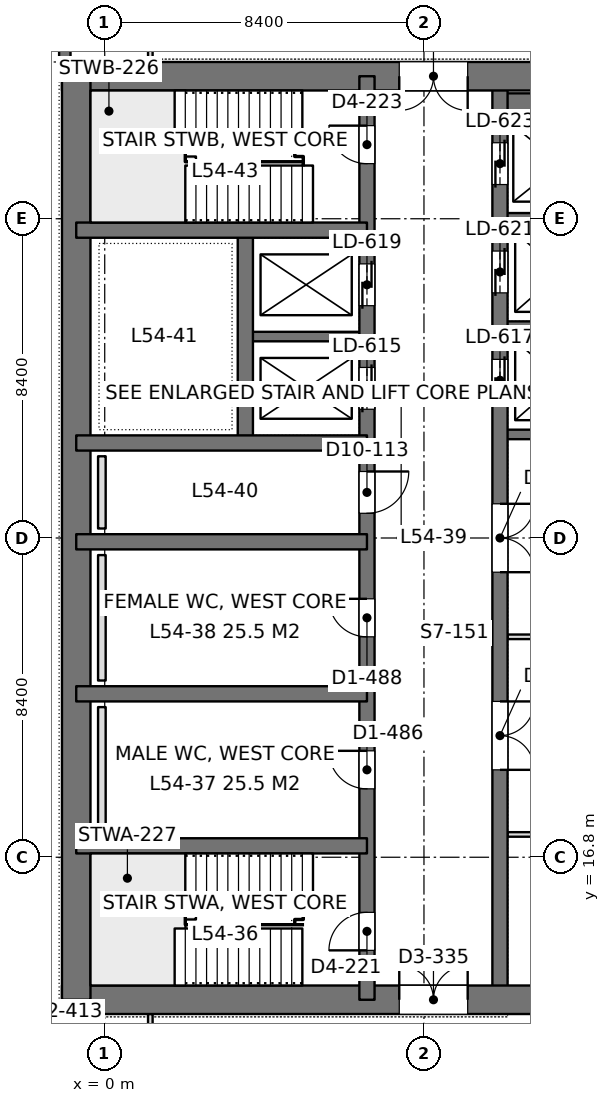
"""IFC4 building model, lengths in metres.
Left out: names, types, materials, properties, quantities, classifications, styles, units other than length and angle.
Written with IfcOpenShell. Run it as: python <this file> out.ifc"""

import sys

from ifc_helpers import new_model, si_unit, direction, frame, frame_2d, origin, place, context, subcontext, project, spatial, rectangle, extrude, element, fill, save


model = new_model("IFC4")
c1 = context("Model", 3, precision=1e-05, world=origin(), true_north=direction((0.0, 1.0)))
c2 = subcontext(c1, "Body", "Model", "MODEL_VIEW")
j1 = project(units=[si_unit("LENGTHUNIT", "METRE"), si_unit("PLANEANGLEUNIT", "RADIAN")], contexts=[c1])
p1 = place(None, origin())
s1 = spatial("IfcSite", under=j1, at=p1, CompositionType="ELEMENT")
p2 = place(p1, origin())
s2 = spatial("IfcBuilding", under=s1, at=p2, CompositionType="ELEMENT")
p3 = place(p2, frame((0.0, 0.0, 236.4)))
s3 = spatial("IfcBuildingStorey", under=s2, at=p3, CompositionType="ELEMENT", Elevation=236.4)
p4 = place(p3, frame((-1.125, 13.05, 0.0), z_axis=(0.0, 0.0, 1.0), x_axis=(1.0, 0.0, 0.0)))
e1 = element("IfcWall", 1, at=p4, inside=s3, PredefinedType="SHEAR", context=c2, shape_type="SweptSolid", body=[
    extrude(rectangle(XDim=17.85, YDim=0.75, at=frame_2d((8.925, 0.0))), origin(), (0.0, 0.0, 1.0), 4.2),
])
p5 = place(p4, frame((8.875, 0.0, 0.0)))
e2 = element("IfcOpeningElement", 2, at=p5, cuts=e1, PredefinedType="OPENING", context=c2, shape_type="SweptSolid", body=[
    extrude(rectangle(XDim=1.8, YDim=2.4, at=frame_2d((0.9, 1.2))), frame((0.0, 0.385, 0.0), z_axis=(0.0, -1.0, 0.0), x_axis=(1.0, 0.0, 0.0)), (0.0, 0.0, 1.0), 0.77),
])
p6 = place(p3, frame((-1.125, 37.35, 0.0), z_axis=(0.0, 0.0, 1.0), x_axis=(1.0, 0.0, 0.0)))
e3 = element("IfcWall", 3, at=p6, inside=s3, PredefinedType="SHEAR", context=c2, shape_type="SweptSolid", body=[
    extrude(rectangle(XDim=17.85, YDim=0.75, at=frame_2d((8.925, 0.0))), origin(), (0.0, 0.0, 1.0), 4.2),
])
p7 = place(p6, frame((8.875, 0.0, 0.0)))
e4 = element("IfcOpeningElement", 4, at=p7, cuts=e3, PredefinedType="OPENING", context=c2, shape_type="SweptSolid", body=[
    extrude(rectangle(XDim=1.8, YDim=2.4, at=frame_2d((0.9, 1.2))), frame((0.0, 0.385, 0.0), z_axis=(0.0, -1.0, 0.0), x_axis=(1.0, 0.0, 0.0)), (0.0, 0.0, 1.0), 0.77),
])
p8 = place(p3, frame((-0.75, 13.05, 0.0), z_axis=(0.0, 0.0, 1.0), x_axis=(0.0, 1.0, 0.0)))
e5 = element("IfcWall", 5, at=p8, inside=s3, PredefinedType="SHEAR", context=c2, shape_type="SweptSolid", body=[
    extrude(rectangle(XDim=24.3, YDim=0.75, at=frame_2d((12.15, 0.0))), origin(), (0.0, 0.0, 1.0), 4.2),
])
p9 = place(p3, frame((6.9, 13.05, 0.0), z_axis=(0.0, 0.0, 1.0), x_axis=(0.0, 1.0, 0.0)))
e6 = element("IfcWall", 6, at=p9, inside=s3, PredefinedType="SHEAR", context=c2, shape_type="SweptSolid", body=[
    extrude(rectangle(XDim=24.3, YDim=0.4, at=frame_2d((12.15, 0.0))), origin(), (0.0, 0.0, 1.0), 4.2),
])
p10 = place(p9, frame((1.3, 0.0, 0.0)))
e7 = element("IfcOpeningElement", 7, at=p10, cuts=e6, PredefinedType="OPENING", context=c2, shape_type="SweptSolid", body=[
    extrude(rectangle(XDim=1.0, YDim=2.2, at=frame_2d((0.5, 1.1))), frame((0.0, 0.21, 0.0), z_axis=(0.0, -1.0, 0.0), x_axis=(1.0, 0.0, 0.0)), (0.0, 0.0, 1.0), 0.42),
])
p11 = place(p9, frame((22.0, 0.0, 0.0)))
e8 = element("IfcOpeningElement", 8, at=p11, cuts=e6, PredefinedType="OPENING", context=c2, shape_type="SweptSolid", body=[
    extrude(rectangle(XDim=1.0, YDim=2.2, at=frame_2d((0.5, 1.1))), frame((0.0, 0.21, 0.0), z_axis=(0.0, -1.0, 0.0), x_axis=(1.0, 0.0, 0.0)), (0.0, 0.0, 1.0), 0.42),
])
p12 = place(p9, frame((5.55, 0.0, 0.0)))
e9 = element("IfcOpeningElement", 9, at=p12, cuts=e6, PredefinedType="OPENING", context=c2, shape_type="SweptSolid", body=[
    extrude(rectangle(XDim=1.0, YDim=2.2, at=frame_2d((0.5, 1.1))), frame((0.0, 0.21, 0.0), z_axis=(0.0, -1.0, 0.0), x_axis=(1.0, 0.0, 0.0)), (0.0, 0.0, 1.0), 0.42),
])
p13 = place(p9, frame((9.55, 0.0, 0.0)))
e10 = element("IfcOpeningElement", 10, at=p13, cuts=e6, PredefinedType="OPENING", context=c2, shape_type="SweptSolid", body=[
    extrude(rectangle(XDim=1.0, YDim=2.2, at=frame_2d((0.5, 1.1))), frame((0.0, 0.21, 0.0), z_axis=(0.0, -1.0, 0.0), x_axis=(1.0, 0.0, 0.0)), (0.0, 0.0, 1.0), 0.42),
])
p14 = place(p9, frame((12.8, 0.0, 0.0)))
e11 = element("IfcOpeningElement", 11, at=p14, cuts=e6, PredefinedType="OPENING", context=c2, shape_type="SweptSolid", body=[
    extrude(rectangle(XDim=1.1, YDim=2.2, at=frame_2d((0.55, 1.1))), frame((0.0, 0.21, 0.0), z_axis=(0.0, -1.0, 0.0), x_axis=(1.0, 0.0, 0.0)), (0.0, 0.0, 1.0), 0.42),
])
p15 = place(p9, frame((15.538, 0.0, 0.0)))
e12 = element("IfcOpeningElement", 12, at=p15, cuts=e6, PredefinedType="OPENING", context=c2, shape_type="SweptSolid", body=[
    extrude(rectangle(XDim=1.1, YDim=2.2, at=frame_2d((0.55, 1.1))), frame((0.0, 0.21, 0.0), z_axis=(0.0, -1.0, 0.0), x_axis=(1.0, 0.0, 0.0)), (0.0, 0.0, 1.0), 0.42),
])
p16 = place(p9, frame((18.262, 0.0, 0.0)))
e13 = element("IfcOpeningElement", 13, at=p16, cuts=e6, PredefinedType="OPENING", context=c2, shape_type="SweptSolid", body=[
    extrude(rectangle(XDim=1.1, YDim=2.2, at=frame_2d((0.55, 1.1))), frame((0.0, 0.21, 0.0), z_axis=(0.0, -1.0, 0.0), x_axis=(1.0, 0.0, 0.0)), (0.0, 0.0, 1.0), 0.42),
])
p17 = place(p3, frame((10.4, 13.05, 0.0), z_axis=(0.0, 0.0, 1.0), x_axis=(0.0, 1.0, 0.0)))
e14 = element("IfcWall", 14, at=p17, inside=s3, PredefinedType="SHEAR", context=c2, shape_type="SweptSolid", body=[
    extrude(rectangle(XDim=24.3, YDim=0.4, at=frame_2d((12.15, 0.0))), origin(), (0.0, 0.0, 1.0), 4.2),
])
p18 = place(p17, frame((15.75, 0.0, 0.0)))
e15 = element("IfcOpeningElement", 15, at=p18, cuts=e14, PredefinedType="OPENING", context=c2, shape_type="SweptSolid", body=[
    extrude(rectangle(XDim=1.1, YDim=2.2, at=frame_2d((0.55, 1.1))), frame((0.0, 0.21, 0.0), z_axis=(0.0, -1.0, 0.0), x_axis=(1.0, 0.0, 0.0)), (0.0, 0.0, 1.0), 0.42),
])
p19 = place(p17, frame((18.6, 0.0, 0.0)))
e16 = element("IfcOpeningElement", 16, at=p19, cuts=e14, PredefinedType="OPENING", context=c2, shape_type="SweptSolid", body=[
    extrude(rectangle(XDim=1.1, YDim=2.2, at=frame_2d((0.55, 1.1))), frame((0.0, 0.21, 0.0), z_axis=(0.0, -1.0, 0.0), x_axis=(1.0, 0.0, 0.0)), (0.0, 0.0, 1.0), 0.42),
])
p20 = place(p17, frame((21.45, 0.0, 0.0)))
e17 = element("IfcOpeningElement", 17, at=p20, cuts=e14, PredefinedType="OPENING", context=c2, shape_type="SweptSolid", body=[
    extrude(rectangle(XDim=1.1, YDim=2.2, at=frame_2d((0.55, 1.1))), frame((0.0, 0.21, 0.0), z_axis=(0.0, -1.0, 0.0), x_axis=(1.0, 0.0, 0.0)), (0.0, 0.0, 1.0), 0.42),
])
p21 = place(p17, frame((6.05, 0.0, 0.0)))
e18 = element("IfcOpeningElement", 18, at=p21, cuts=e14, PredefinedType="OPENING", context=c2, shape_type="SweptSolid", body=[
    extrude(rectangle(XDim=1.8, YDim=2.4, at=frame_2d((0.9, 1.2))), frame((0.0, 0.21, 0.0), z_axis=(0.0, -1.0, 0.0), x_axis=(1.0, 0.0, 0.0)), (0.0, 0.0, 1.0), 0.42),
])
p22 = place(p17, frame((11.25, 0.0, 0.0)))
e19 = element("IfcOpeningElement", 19, at=p22, cuts=e14, PredefinedType="OPENING", context=c2, shape_type="SweptSolid", body=[
    extrude(rectangle(XDim=1.8, YDim=2.4, at=frame_2d((0.9, 1.2))), frame((0.0, 0.21, 0.0), z_axis=(0.0, -1.0, 0.0), x_axis=(1.0, 0.0, 0.0)), (0.0, 0.0, 1.0), 0.42),
])
for number, where, z_axis, x_axis in (
    (20, (-0.75, 17.1, 0.0), (0.0, 0.0, 1.0), (1.0, 0.0, 0.0)),
    (21, (-0.75, 21.1, 0.0), (0.0, 0.0, 1.0), (1.0, 0.0, 0.0)),
    (22, (-0.75, 25.1, 0.0), (0.0, 0.0, 1.0), (1.0, 0.0, 0.0)),
    (23, (-0.75, 27.7, 0.0), (0.0, 0.0, 1.0), (1.0, 0.0, 0.0)),
    (24, (-0.75, 33.3, 0.0), (0.0, 0.0, 1.0), (1.0, 0.0, 0.0)),
):
    element("IfcWall", number, at=place(p3, frame(where, z_axis=z_axis, x_axis=x_axis)), inside=s3, PredefinedType="SHEAR", context=c2, shape_type="SweptSolid", body=[
        extrude(rectangle(XDim=7.65, YDim=0.4, at=frame_2d((3.825, 0.0))), origin(), (0.0, 0.0, 1.0), 4.2),
    ])
p23 = place(p3, frame((3.7, 27.7, 0.0), z_axis=(0.0, 0.0, 1.0), x_axis=(0.0, 1.0, 0.0)))
e25 = element("IfcWall", 25, at=p23, inside=s3, PredefinedType="SHEAR", context=c2, shape_type="SweptSolid", body=[
    extrude(rectangle(XDim=5.6, YDim=0.4, at=frame_2d((2.8, 0.0))), origin(), (0.0, 0.0, 1.0), 4.2),
])
p24 = place(p3, frame((3.7, 30.5, 0.0), z_axis=(0.0, 0.0, 1.0), x_axis=(1.0, 0.0, 0.0)))
e26 = element("IfcWall", 26, at=p24, inside=s3, PredefinedType="SHEAR", context=c2, shape_type="SweptSolid", body=[
    extrude(rectangle(XDim=3.2, YDim=0.25, at=frame_2d((1.6, 0.0))), origin(), (0.0, 0.0, 1.0), 4.2),
])
p25 = place(p3, frame((10.4, 27.925, 0.0), z_axis=(0.0, 0.0, 1.0), x_axis=(1.0, 0.0, 0.0)))
e27 = element("IfcWall", 27, at=p25, inside=s3, PredefinedType="SHEAR", context=c2, shape_type="SweptSolid", body=[
    extrude(rectangle(XDim=5.95, YDim=0.25, at=frame_2d((2.975, 0.0))), origin(), (0.0, 0.0, 1.0), 4.2),
])
for number, where, z_axis, x_axis in (
    (28, (10.4, 30.775, 0.0), (0.0, 0.0, 1.0), (1.0, 0.0, 0.0)),
    (29, (10.4, 33.625, 0.0), (0.0, 0.0, 1.0), (1.0, 0.0, 0.0)),
):
    element("IfcWall", number, at=place(p3, frame(where, z_axis=z_axis, x_axis=x_axis)), inside=s3, PredefinedType="SHEAR", context=c2, shape_type="SweptSolid", body=[
        extrude(rectangle(XDim=3.2, YDim=0.25, at=frame_2d((1.6, 0.0))), origin(), (0.0, 0.0, 1.0), 4.2),
    ])
p26 = place(p3, frame((10.4, 36.625, 0.0), z_axis=(0.0, 0.0, 1.0), x_axis=(1.0, 0.0, 0.0)))
e30 = element("IfcWall", 30, at=p26, inside=s3, PredefinedType="SHEAR", context=c2, shape_type="SweptSolid", body=[
    extrude(rectangle(XDim=3.2, YDim=0.55, at=frame_2d((1.6, 0.0))), origin(), (0.0, 0.0, 1.0), 4.2),
])
p27 = place(p3, frame((-1.05, 8.4, 0.0), z_axis=(0.0, 0.0, 1.0), x_axis=(0.0, 1.0, 0.0)))
e31 = element("IfcWall", 31, at=p27, inside=s3, PredefinedType="SOLIDWALL", context=c2, shape_type="SweptSolid", body=[
    extrude(rectangle(XDim=4.275, YDim=0.3, at=frame_2d((2.138, 0.0))), origin(), (0.0, 0.0, 1.0), 4.05),
])
p28 = place(p27, frame((0.938, 0.0, 0.9)))
e32 = element("IfcOpeningElement", 32, at=p28, cuts=e31, PredefinedType="OPENING", context=c2, shape_type="SweptSolid", body=[
    extrude(rectangle(XDim=2.4, YDim=1.9, at=frame_2d((1.2, 0.95))), frame((0.0, 0.16, 0.0), z_axis=(0.0, -1.0, 0.0), x_axis=(1.0, 0.0, 0.0)), (0.0, 0.0, 1.0), 0.32),
])
p29 = place(p3, frame((-1.05, 37.725, 0.0), z_axis=(0.0, 0.0, 1.0), x_axis=(0.0, 1.0, 0.0)))
e33 = element("IfcWall", 33, at=p29, inside=s3, PredefinedType="SOLIDWALL", context=c2, shape_type="SweptSolid", body=[
    extrude(rectangle(XDim=4.275, YDim=0.3, at=frame_2d((2.137, 0.0))), origin(), (0.0, 0.0, 1.0), 4.05),
])
p30 = place(p29, frame((0.938, 0.0, 0.9)))
e34 = element("IfcOpeningElement", 34, at=p30, cuts=e33, PredefinedType="OPENING", context=c2, shape_type="SweptSolid", body=[
    extrude(rectangle(XDim=2.4, YDim=1.9, at=frame_2d((1.2, 0.95))), frame((0.0, 0.16, 0.0), z_axis=(0.0, -1.0, 0.0), x_axis=(1.0, 0.0, 0.0)), (0.0, 0.0, 1.0), 0.32),
])
p31 = place(p3, frame((10.598, 17.4, 0.0), z_axis=(0.0, 0.0, 1.0), x_axis=(1.0, 0.0, 0.0)))
e35 = element("IfcWall", 35, at=p31, inside=s3, PredefinedType="PARTITIONING", context=c2, shape_type="SweptSolid", body=[
    extrude(rectangle(XDim=5.904, YDim=0.12, at=frame_2d((2.952, 0.0))), origin(), (0.0, 0.0, 1.0), 3.55),
])
p32 = place(p3, frame((10.598, 22.6, 0.0), z_axis=(0.0, 0.0, 1.0), x_axis=(1.0, 0.0, 0.0)))
e36 = element("IfcWall", 36, at=p32, inside=s3, PredefinedType="PARTITIONING", context=c2, shape_type="SweptSolid", body=[
    extrude(rectangle(XDim=5.053, YDim=0.12, at=frame_2d((2.526, 0.0))), origin(), (0.0, 0.0, 1.0), 4.05),
])
for number, where, z_axis, x_axis in (
    (37, (1.2, 11.1, 0.0), (0.0, 0.0, 1.0), (0.0, 1.0, 0.0)),
    (38, (1.2, 37.724, 0.0), (0.0, 0.0, 1.0), (0.0, 1.0, 0.0)),
):
    element("IfcWall", number, at=place(p3, frame(where, z_axis=z_axis, x_axis=x_axis)), inside=s3, PredefinedType="PARTITIONING", context=c2, shape_type="SweptSolid", body=[
        extrude(rectangle(XDim=1.576, YDim=0.12, at=frame_2d((0.788, 0.0))), origin(), (0.0, 0.0, 1.0), 4.05),
    ])
for number, where, z_axis, x_axis in (
    (39, (-0.075, 17.45, 0.0), (0.0, 0.0, 1.0), (0.0, 1.0, 0.0)),
    (40, (-0.075, 21.45, 0.0), (0.0, 0.0, 1.0), (0.0, 1.0, 0.0)),
):
    element("IfcWall", number, at=place(p3, frame(where, z_axis=z_axis, x_axis=x_axis)), inside=s3, PredefinedType="PLUMBINGWALL", context=c2, shape_type="SweptSolid", body=[
        extrude(rectangle(XDim=3.3, YDim=0.2, at=frame_2d((1.65, 0.0))), origin(), (0.0, 0.0, 1.0), 1.2),
    ])
p33 = place(p3, frame((-0.075, 25.45, 0.0), z_axis=(0.0, 0.0, 1.0), x_axis=(0.0, 1.0, 0.0)))
e41 = element("IfcWall", 41, at=p33, inside=s3, PredefinedType="PLUMBINGWALL", context=c2, shape_type="SweptSolid", body=[
    extrude(rectangle(XDim=1.9, YDim=0.2, at=frame_2d((0.95, 0.0))), origin(), (0.0, 0.0, 1.0), 1.2),
])
p34 = place(p5, origin())
e42 = element("IfcDoor", 42, at=p34, inside=s3, OperationType="DOUBLE_DOOR_SINGLE_SWING", PredefinedType="DOOR", context=c2, shape_type="SweptSolid", body=[
    extrude(rectangle(XDim=1.8, YDim=2.4, at=frame_2d((0.9, 1.2))), frame((0.0, 0.025, 0.0), z_axis=(0.0, -1.0, 0.0), x_axis=(1.0, 0.0, 0.0)), (0.0, 0.0, 1.0), 0.05),
])
fill(e2, e42)
p35 = place(p7, frame((1.8, 0.0, 0.0), z_axis=(0.0, 0.0, 1.0), x_axis=(-1.0, 0.0, 0.0)))
e43 = element("IfcDoor", 43, at=p35, inside=s3, OperationType="DOUBLE_DOOR_SINGLE_SWING", PredefinedType="DOOR", context=c2, shape_type="SweptSolid", body=[
    extrude(rectangle(XDim=1.8, YDim=2.4, at=frame_2d((0.9, 1.2))), frame((0.0, 0.025, 0.0), z_axis=(0.0, -1.0, 0.0), x_axis=(1.0, 0.0, 0.0)), (0.0, 0.0, 1.0), 0.05),
])
fill(e4, e43)
p36 = place(p10, origin())
e44 = element("IfcDoor", 44, at=p36, inside=s3, OperationType="SINGLE_SWING_LEFT", PredefinedType="DOOR", context=c2, shape_type="SweptSolid", body=[
    extrude(rectangle(XDim=1.0, YDim=2.2, at=frame_2d((0.5, 1.1))), frame((0.0, 0.025, 0.0), z_axis=(0.0, -1.0, 0.0), x_axis=(1.0, 0.0, 0.0)), (0.0, 0.0, 1.0), 0.05),
])
fill(e7, e44)
p37 = place(p11, origin())
e45 = element("IfcDoor", 45, at=p37, inside=s3, OperationType="SINGLE_SWING_RIGHT", PredefinedType="DOOR", context=c2, shape_type="SweptSolid", body=[
    extrude(rectangle(XDim=1.0, YDim=2.2, at=frame_2d((0.5, 1.1))), frame((0.0, 0.025, 0.0), z_axis=(0.0, -1.0, 0.0), x_axis=(1.0, 0.0, 0.0)), (0.0, 0.0, 1.0), 0.05),
])
fill(e8, e45)
p38 = place(p12, origin())
e46 = element("IfcDoor", 46, at=p38, inside=s3, OperationType="SINGLE_SWING_RIGHT", PredefinedType="DOOR", context=c2, shape_type="SweptSolid", body=[
    extrude(rectangle(XDim=1.0, YDim=2.2, at=frame_2d((0.5, 1.1))), frame((0.0, 0.025, 0.0), z_axis=(0.0, -1.0, 0.0), x_axis=(1.0, 0.0, 0.0)), (0.0, 0.0, 1.0), 0.05),
])
fill(e9, e46)
p39 = place(p13, origin())
e47 = element("IfcDoor", 47, at=p39, inside=s3, OperationType="SINGLE_SWING_RIGHT", PredefinedType="DOOR", context=c2, shape_type="SweptSolid", body=[
    extrude(rectangle(XDim=1.0, YDim=2.2, at=frame_2d((0.5, 1.1))), frame((0.0, 0.025, 0.0), z_axis=(0.0, -1.0, 0.0), x_axis=(1.0, 0.0, 0.0)), (0.0, 0.0, 1.0), 0.05),
])
fill(e10, e47)
p40 = place(p14, frame((1.1, 0.0, 0.0), z_axis=(0.0, 0.0, 1.0), x_axis=(-1.0, 0.0, 0.0)))
e48 = element("IfcDoor", 48, at=p40, inside=s3, OperationType="SINGLE_SWING_LEFT", PredefinedType="DOOR", context=c2, shape_type="SweptSolid", body=[
    extrude(rectangle(XDim=1.1, YDim=2.2, at=frame_2d((0.55, 1.1))), frame((0.0, 0.025, 0.0), z_axis=(0.0, -1.0, 0.0), x_axis=(1.0, 0.0, 0.0)), (0.0, 0.0, 1.0), 0.05),
])
fill(e11, e48)
p41 = place(p18, origin())
e49 = element("IfcDoor", 49, at=p41, inside=s3, OperationType="DOUBLE_DOOR_SLIDING", PredefinedType="DOOR", context=c2, shape_type="SweptSolid", body=[
    extrude(rectangle(XDim=1.1, YDim=2.2, at=frame_2d((0.55, 1.1))), frame((0.0, 0.025, 0.0), z_axis=(0.0, -1.0, 0.0), x_axis=(1.0, 0.0, 0.0)), (0.0, 0.0, 1.0), 0.05),
])
fill(e15, e49)
p42 = place(p19, origin())
e50 = element("IfcDoor", 50, at=p42, inside=s3, OperationType="DOUBLE_DOOR_SLIDING", PredefinedType="DOOR", context=c2, shape_type="SweptSolid", body=[
    extrude(rectangle(XDim=1.1, YDim=2.2, at=frame_2d((0.55, 1.1))), frame((0.0, 0.025, 0.0), z_axis=(0.0, -1.0, 0.0), x_axis=(1.0, 0.0, 0.0)), (0.0, 0.0, 1.0), 0.05),
])
fill(e16, e50)
p43 = place(p20, origin())
e51 = element("IfcDoor", 51, at=p43, inside=s3, OperationType="DOUBLE_DOOR_SLIDING", PredefinedType="DOOR", context=c2, shape_type="SweptSolid", body=[
    extrude(rectangle(XDim=1.1, YDim=2.2, at=frame_2d((0.55, 1.1))), frame((0.0, 0.025, 0.0), z_axis=(0.0, -1.0, 0.0), x_axis=(1.0, 0.0, 0.0)), (0.0, 0.0, 1.0), 0.05),
])
fill(e17, e51)
p44 = place(p15, origin())
e52 = element("IfcDoor", 52, at=p44, inside=s3, OperationType="DOUBLE_DOOR_SLIDING", PredefinedType="DOOR", context=c2, shape_type="SweptSolid", body=[
    extrude(rectangle(XDim=1.1, YDim=2.2, at=frame_2d((0.55, 1.1))), frame((0.0, 0.025, 0.0), z_axis=(0.0, -1.0, 0.0), x_axis=(1.0, 0.0, 0.0)), (0.0, 0.0, 1.0), 0.05),
])
fill(e12, e52)
p45 = place(p16, origin())
e53 = element("IfcDoor", 53, at=p45, inside=s3, OperationType="DOUBLE_DOOR_SLIDING", PredefinedType="DOOR", context=c2, shape_type="SweptSolid", body=[
    extrude(rectangle(XDim=1.1, YDim=2.2, at=frame_2d((0.55, 1.1))), frame((0.0, 0.025, 0.0), z_axis=(0.0, -1.0, 0.0), x_axis=(1.0, 0.0, 0.0)), (0.0, 0.0, 1.0), 0.05),
])
fill(e13, e53)
p46 = place(p21, frame((1.8, 0.0, 0.0), z_axis=(0.0, 0.0, 1.0), x_axis=(-1.0, 0.0, 0.0)))
e54 = element("IfcDoor", 54, at=p46, inside=s3, OperationType="DOUBLE_DOOR_SINGLE_SWING", PredefinedType="DOOR", context=c2, shape_type="SweptSolid", body=[
    extrude(rectangle(XDim=1.8, YDim=2.4, at=frame_2d((0.9, 1.2))), frame((0.0, 0.025, 0.0), z_axis=(0.0, -1.0, 0.0), x_axis=(1.0, 0.0, 0.0)), (0.0, 0.0, 1.0), 0.05),
])
fill(e18, e54)
p47 = place(p22, frame((1.8, 0.0, 0.0), z_axis=(0.0, 0.0, 1.0), x_axis=(-1.0, 0.0, 0.0)))
e55 = element("IfcDoor", 55, at=p47, inside=s3, OperationType="DOUBLE_DOOR_SINGLE_SWING", PredefinedType="DOOR", context=c2, shape_type="SweptSolid", body=[
    extrude(rectangle(XDim=1.8, YDim=2.4, at=frame_2d((0.9, 1.2))), frame((0.0, 0.025, 0.0), z_axis=(0.0, -1.0, 0.0), x_axis=(1.0, 0.0, 0.0)), (0.0, 0.0, 1.0), 0.05),
])
fill(e19, e55)
save(model, sys.argv[1])
